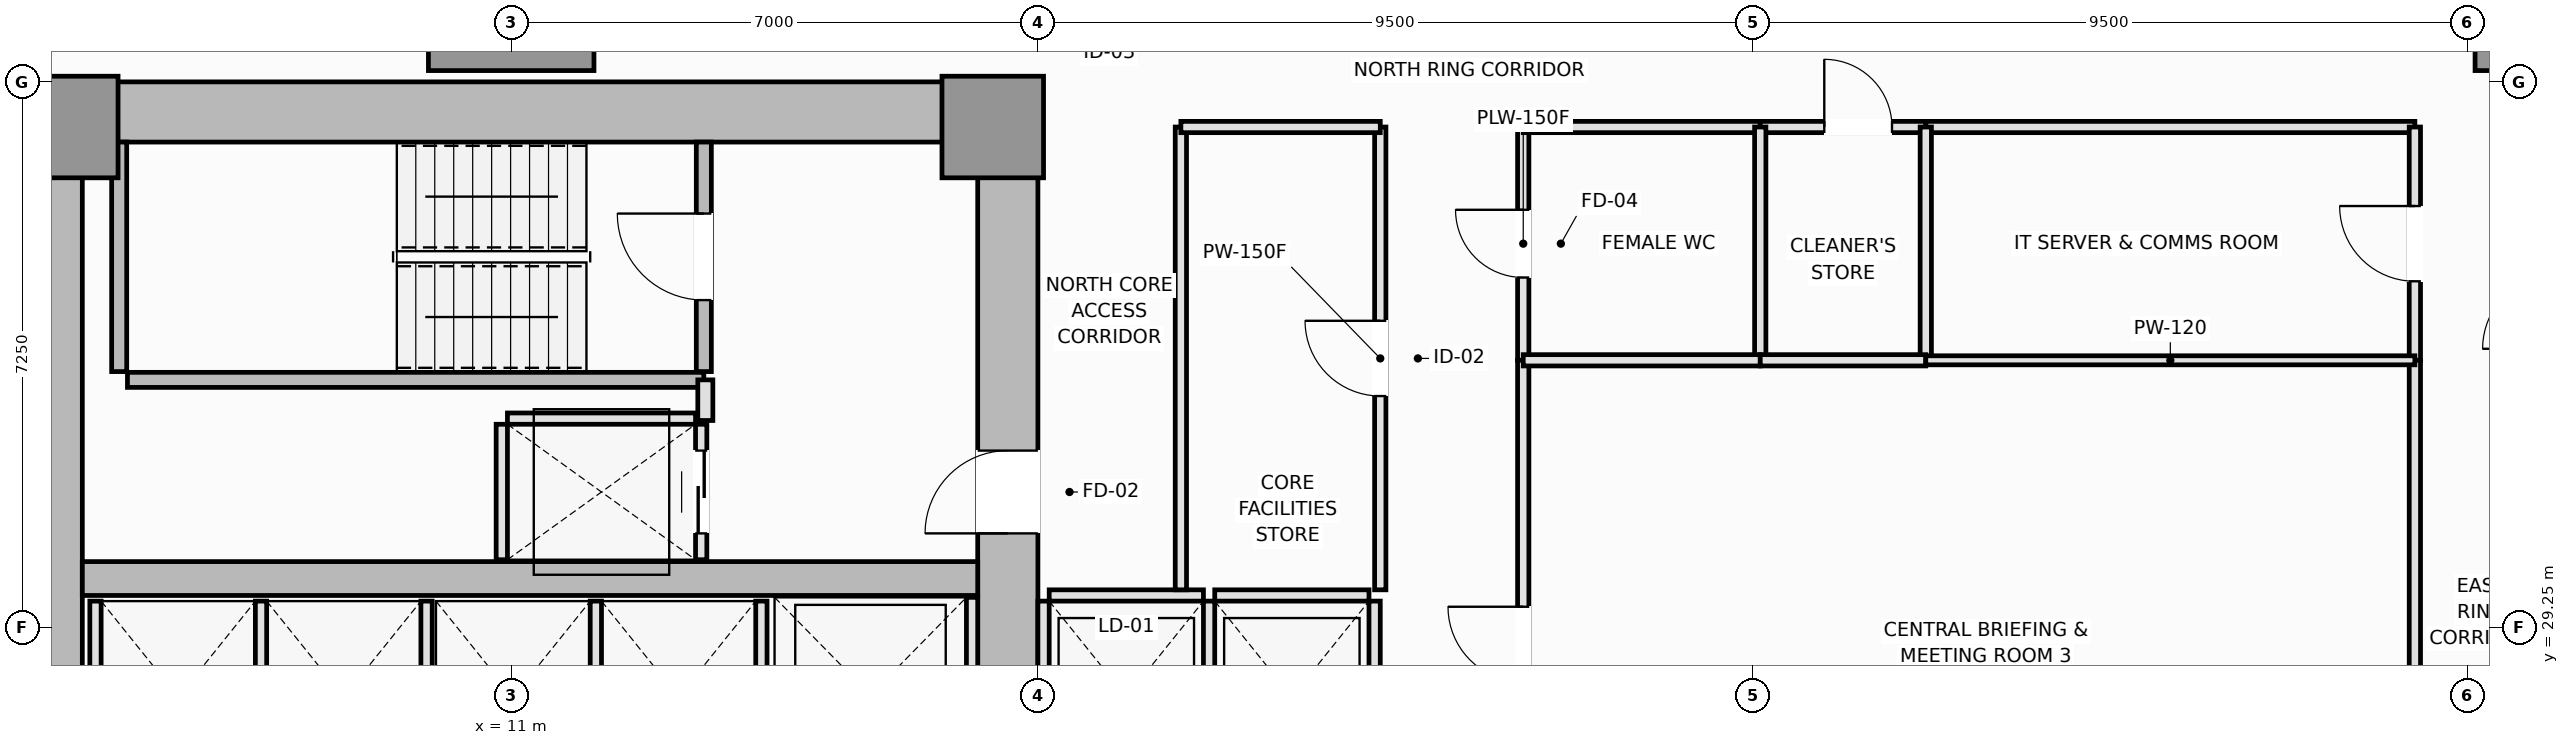
"""IFC4 building model, lengths in metres.
Left out: names, types, materials, properties, quantities, classifications, styles, units other than length and angle.
Written with IfcOpenShell. Run it as: python <this file> out.ifc"""

import sys

from ifc_helpers import new_model, si_unit, direction, frame, frame_2d, origin, origin_2d, place, context, subcontext, project, spatial, rectangle, extrude, element, fill, save


model = new_model("IFC4")
c1 = context("Model", 3, precision=1e-05, world=origin(), true_north=direction((0.0, 1.0)))
c2 = subcontext(c1, "Body", "Model", "MODEL_VIEW")
j1 = project(units=[si_unit("LENGTHUNIT", "METRE"), si_unit("PLANEANGLEUNIT", "RADIAN")], contexts=[c1])
p1 = place(None, origin())
s1 = spatial("IfcSite", under=j1, at=p1, CompositionType="ELEMENT")
p2 = place(p1, origin())
s2 = spatial("IfcBuilding", under=s1, at=p2, CompositionType="ELEMENT")
p3 = place(p2, frame((0.0, 0.0, 61.1)))
s3 = spatial("IfcBuildingStorey", under=s2, at=p3, CompositionType="ELEMENT", Elevation=61.1)
p4 = place(p3, frame((4.5, 36.1, 0.0), z_axis=(0.0, 0.0, 1.0), x_axis=(1.0, 0.0, 0.0)))
e1 = element("IfcWall", 1, at=p4, inside=s3, PredefinedType="SHEAR", context=c2, shape_type="SweptSolid", body=[
    extrude(rectangle(XDim=13.5, YDim=0.8, at=frame_2d((6.75, 0.0))), origin(), (0.0, 0.0, 1.0), 3.55),
])
p5 = place(p3, frame((4.9, 14.8, 0.0), z_axis=(0.0, 0.0, 1.0), x_axis=(0.0, 1.0, 0.0)))
e2 = element("IfcWall", 2, at=p5, inside=s3, PredefinedType="SHEAR", context=c2, shape_type="SweptSolid", body=[
    extrude(rectangle(XDim=20.9, YDim=0.8, at=frame_2d((10.45, 0.0))), origin(), (0.0, 0.0, 1.0), 3.55),
])
p6 = place(p3, frame((17.6, 27.05, 0.0), z_axis=(0.0, 0.0, 1.0), x_axis=(0.0, 1.0, 0.0)))
e3 = element("IfcWall", 3, at=p6, inside=s3, PredefinedType="SHEAR", context=c2, shape_type="SweptSolid", body=[
    extrude(rectangle(XDim=8.65, YDim=0.8, at=frame_2d((4.325, 0.0))), origin(), (0.0, 0.0, 1.0), 3.55),
])
p7 = place(p6, frame((3.45, 0.0, 0.0)))
e4 = element("IfcOpeningElement", 4, at=p7, cuts=e3, PredefinedType="OPENING", context=c2, shape_type="SweptSolid", body=[
    extrude(rectangle(XDim=1.1, YDim=2.15, at=frame_2d((0.55, 1.075))), frame((0.0, 0.41, 0.0), z_axis=(0.0, -1.0, 0.0), x_axis=(1.0, 0.0, 0.0)), (0.0, 0.0, 1.0), 0.82),
])
p8 = place(p3, frame((5.3, 29.9, 0.0), z_axis=(0.0, 0.0, 1.0), x_axis=(1.0, 0.0, 0.0)))
e5 = element("IfcWall", 5, at=p8, inside=s3, PredefinedType="SHEAR", context=c2, shape_type="SweptSolid", body=[
    extrude(rectangle(XDim=11.9, YDim=0.45, at=frame_2d((5.95, 0.0))), origin(), (0.0, 0.0, 1.0), 3.55),
])
for number, where, z_axis, x_axis in (
    (6, (5.1, 35.9, 0.0), (0.0, 0.0, 1.0), (1.0, 0.0, 0.0)),
    (7, (17.4, 35.9, 0.0), (0.0, 0.0, 1.0), (1.0, 0.0, 0.0)),
):
    element("IfcColumn", number, at=place(p3, frame(where, z_axis=z_axis, x_axis=x_axis)), inside=s3, PredefinedType="PILASTER", context=c2, shape_type="SweptSolid", body=[
        extrude(rectangle(XDim=1.35, YDim=1.35, at=origin_2d()), origin(), (0.0, 0.0, 1.0), 3.55),
    ])
for number, where, z_axis, x_axis in (
    (8, (11.0, 37.75, 0.0), (0.0, 0.0, 1.0), (1.0, 0.0, 0.0)),
    (9, (38.2, 37.75, 0.0), (0.0, 0.0, 1.0), (1.0, 0.0, 0.0)),
):
    element("IfcColumn", number, at=place(p3, frame(where, z_axis=z_axis, x_axis=x_axis)), inside=s3, PredefinedType="COLUMN", context=c2, shape_type="SweptSolid", body=[
        extrude(rectangle(XDim=2.2, YDim=2.2, at=origin_2d()), origin(), (0.0, 0.0, 1.0), 3.55),
    ])
p9 = place(p3, frame((5.79, 32.65, 0.0), z_axis=(0.0, 0.0, 1.0), x_axis=(0.0, 1.0, 0.0)))
e10 = element("IfcWall", 10, at=p9, inside=s3, PredefinedType="SOLIDWALL", context=c2, shape_type="SweptSolid", body=[
    extrude(rectangle(XDim=3.05, YDim=0.2, at=frame_2d((1.525, 0.0))), origin(), (0.0, 0.0, 1.0), 3.55),
])
p10 = place(p3, frame((5.9, 32.54, 0.0), z_axis=(0.0, 0.0, 1.0), x_axis=(1.0, 0.0, 0.0)))
e11 = element("IfcWall", 11, at=p10, inside=s3, PredefinedType="SOLIDWALL", context=c2, shape_type="SweptSolid", body=[
    extrude(rectangle(XDim=7.66, YDim=0.2, at=frame_2d((3.83, 0.0))), origin(), (0.0, 0.0, 1.0), 3.55),
])
p11 = place(p3, frame((13.56, 32.65, 0.0), z_axis=(0.0, 0.0, 1.0), x_axis=(0.0, 1.0, 0.0)))
e12 = element("IfcWall", 12, at=p11, inside=s3, PredefinedType="SOLIDWALL", context=c2, shape_type="SweptSolid", body=[
    extrude(rectangle(XDim=3.05, YDim=0.2, at=frame_2d((1.525, 0.0))), origin(), (0.0, 0.0, 1.0), 3.55),
])
p12 = place(p11, frame((0.95, 0.0, 0.0)))
e13 = element("IfcOpeningElement", 13, at=p12, cuts=e12, PredefinedType="OPENING", context=c2, shape_type="SweptSolid", body=[
    extrude(rectangle(XDim=1.15, YDim=2.15, at=frame_2d((0.575, 1.075))), frame((0.0, 0.11, 0.0), z_axis=(0.0, -1.0, 0.0), x_axis=(1.0, 0.0, 0.0)), (0.0, 0.0, 1.0), 0.22),
])
p13 = place(p3, frame((18.15, 29.675, 0.0), z_axis=(0.0, 0.0, 1.0), x_axis=(1.0, 0.0, 0.0)))
e14 = element("IfcWall", 14, at=p13, inside=s3, PredefinedType="PARTITIONING", context=c2, shape_type="SweptSolid", body=[
    extrude(rectangle(XDim=2.05, YDim=0.15, at=frame_2d((1.025, 0.0))), origin(), (0.0, 0.0, 1.0), 3.37),
])
for number, where, z_axis, x_axis in (
    (15, (18.075, 27.05, 0.0), (0.0, 0.0, 1.0), (0.0, 1.0, 0.0)),
    (16, (20.275, 27.05, 0.0), (0.0, 0.0, 1.0), (0.0, 1.0, 0.0)),
):
    element("IfcWall", number, at=place(p3, frame(where, z_axis=z_axis, x_axis=x_axis)), inside=s3, PredefinedType="PARTITIONING", context=c2, shape_type="SweptSolid", body=[
        extrude(rectangle(XDim=2.55, YDim=0.15, at=frame_2d((1.275, 0.0))), origin(), (0.0, 0.0, 1.0), 3.37),
    ])
p14 = place(p3, frame((20.35, 29.675, 0.0), z_axis=(0.0, 0.0, 1.0), x_axis=(1.0, 0.0, 0.0)))
e17 = element("IfcWall", 17, at=p14, inside=s3, PredefinedType="PARTITIONING", context=c2, shape_type="SweptSolid", body=[
    extrude(rectangle(XDim=2.05, YDim=0.15, at=frame_2d((1.025, 0.0))), origin(), (0.0, 0.0, 1.0), 3.37),
])
for number, where, z_axis, x_axis in (
    (18, (22.475, 27.05, 0.0), (0.0, 0.0, 1.0), (0.0, 1.0, 0.0)),
    (19, (5.475, 27.05, 0.0), (0.0, 0.0, 1.0), (0.0, 1.0, 0.0)),
    (20, (7.675, 27.05, 0.0), (0.0, 0.0, 1.0), (0.0, 1.0, 0.0)),
    (21, (9.875, 27.05, 0.0), (0.0, 0.0, 1.0), (0.0, 1.0, 0.0)),
    (22, (12.125, 27.05, 0.0), (0.0, 0.0, 1.0), (0.0, 1.0, 0.0)),
    (23, (14.325, 27.05, 0.0), (0.0, 0.0, 1.0), (0.0, 1.0, 0.0)),
):
    element("IfcWall", number, at=place(p3, frame(where, z_axis=z_axis, x_axis=x_axis)), inside=s3, PredefinedType="PARTITIONING", context=c2, shape_type="SweptSolid", body=[
        extrude(rectangle(XDim=2.55, YDim=0.15, at=frame_2d((1.275, 0.0))), origin(), (0.0, 0.0, 1.0), 3.37),
    ])
p15 = place(p3, frame((17.125, 27.05, 0.0), z_axis=(0.0, 0.0, 1.0), x_axis=(0.0, 1.0, 0.0)))
e24 = element("IfcWall", 24, at=p15, inside=s3, PredefinedType="PARTITIONING", context=c2, shape_type="SweptSolid", body=[
    extrude(rectangle(XDim=2.6, YDim=0.15, at=frame_2d((1.3, 0.0))), origin(), (0.0, 0.0, 1.0), 3.37),
])
p16 = place(p3, frame((10.95, 32.025, 0.0), z_axis=(0.0, 0.0, 1.0), x_axis=(1.0, 0.0, 0.0)))
e25 = element("IfcWall", 25, at=p16, inside=s3, PredefinedType="PARTITIONING", context=c2, shape_type="SweptSolid", body=[
    extrude(rectangle(XDim=2.5, YDim=0.15, at=frame_2d((1.25, 0.0))), origin(), (0.0, 0.0, 1.0), 3.37),
])
p17 = place(p3, frame((10.875, 30.15, 0.0), z_axis=(0.0, 0.0, 1.0), x_axis=(0.0, 1.0, 0.0)))
e26 = element("IfcWall", 26, at=p17, inside=s3, PredefinedType="PARTITIONING", context=c2, shape_type="SweptSolid", body=[
    extrude(rectangle(XDim=1.8, YDim=0.15, at=frame_2d((0.9, 0.0))), origin(), (0.0, 0.0, 1.0), 3.37),
])
p18 = place(p3, frame((13.525, 30.15, 0.0), z_axis=(0.0, 0.0, 1.0), x_axis=(0.0, 1.0, 0.0)))
e27 = element("IfcWall", 27, at=p18, inside=s3, PredefinedType="PARTITIONING", context=c2, shape_type="SweptSolid", body=[
    extrude(rectangle(XDim=1.8, YDim=0.15, at=frame_2d((0.9, 0.0))), origin(), (0.0, 0.0, 1.0), 3.37),
])
p19 = place(p18, frame((0.35, 0.0, 0.0)))
e28 = element("IfcOpeningElement", 28, at=p19, cuts=e27, PredefinedType="OPENING", context=c2, shape_type="SweptSolid", body=[
    extrude(rectangle(XDim=1.1, YDim=2.2, at=frame_2d((0.55, 1.1))), frame((0.0, 0.085, 0.0), z_axis=(0.0, -1.0, 0.0), x_axis=(1.0, 0.0, 0.0)), (0.0, 0.0, 1.0), 0.17),
])
p20 = place(p3, frame((13.58, 32.0, 0.0), z_axis=(0.0, 0.0, 1.0), x_axis=(0.0, 1.0, 0.0)))
e29 = element("IfcWall", 29, at=p20, inside=s3, PredefinedType="PARTITIONING", context=c2, shape_type="SweptSolid", body=[
    extrude(rectangle(XDim=0.54, YDim=0.2, at=frame_2d((0.27, 0.0))), origin(), (0.0, 0.0, 1.0), 3.37),
])
p21 = place(p3, frame((22.55, 29.75, 0.0), z_axis=(0.0, 0.0, 1.0), x_axis=(0.0, 1.0, 0.0)))
e30 = element("IfcWall", 30, at=p21, inside=s3, PredefinedType="PARTITIONING", context=c2, shape_type="SweptSolid", body=[
    extrude(rectangle(XDim=6.15, YDim=0.15, at=frame_2d((3.075, 0.0))), origin(), (0.0, 0.0, 1.0), 3.01),
])
p22 = place(p21, frame((2.575, 0.0, 0.0)))
e31 = element("IfcOpeningElement", 31, at=p22, cuts=e30, PredefinedType="OPENING", context=c2, shape_type="SweptSolid", body=[
    extrude(rectangle(XDim=1.0, YDim=2.15, at=frame_2d((0.5, 1.075))), frame((0.0, 0.085, 0.0), z_axis=(0.0, -1.0, 0.0), x_axis=(1.0, 0.0, 0.0)), (0.0, 0.0, 1.0), 0.17),
])
p23 = place(p3, frame((24.45, 32.8, 0.0), z_axis=(0.0, 0.0, 1.0), x_axis=(0.0, 1.0, 0.0)))
e32 = element("IfcWall", 32, at=p23, inside=s3, PredefinedType="PLUMBINGWALL", context=c2, shape_type="SweptSolid", body=[
    extrude(rectangle(XDim=3.1, YDim=0.15, at=frame_2d((1.55, 0.0))), origin(), (0.0, 0.0, 1.0), 3.37),
])
p24 = place(p23, frame((1.1, 0.0, 0.0)))
e33 = element("IfcOpeningElement", 33, at=p24, cuts=e32, PredefinedType="OPENING", context=c2, shape_type="SweptSolid", body=[
    extrude(rectangle(XDim=0.9, YDim=2.1, at=frame_2d((0.45, 1.05))), frame((0.0, 0.085, 0.0), z_axis=(0.0, -1.0, 0.0), x_axis=(1.0, 0.0, 0.0)), (0.0, 0.0, 1.0), 0.17),
])
p25 = place(p3, frame((24.45, 25.25, 0.0), z_axis=(0.0, 0.0, 1.0), x_axis=(0.0, 1.0, 0.0)))
e34 = element("IfcWall", 34, at=p25, inside=s3, PredefinedType="PARTITIONING", context=c2, shape_type="SweptSolid", body=[
    extrude(rectangle(XDim=7.55, YDim=0.15, at=frame_2d((3.775, 0.0))), origin(), (0.0, 0.0, 1.0), 3.37),
])
p26 = place(p25, frame((3.275, 0.0, 0.0)))
e35 = element("IfcOpeningElement", 35, at=p26, cuts=e34, PredefinedType="OPENING", context=c2, shape_type="SweptSolid", body=[
    extrude(rectangle(XDim=1.0, YDim=2.15, at=frame_2d((0.5, 1.075))), frame((0.0, 0.085, 0.0), z_axis=(0.0, -1.0, 0.0), x_axis=(1.0, 0.0, 0.0)), (0.0, 0.0, 1.0), 0.17),
])
p27 = place(p3, frame((19.9, 29.75, 0.0), z_axis=(0.0, 0.0, 1.0), x_axis=(0.0, 1.0, 0.0)))
e36 = element("IfcWall", 36, at=p27, inside=s3, PredefinedType="PARTITIONING", context=c2, shape_type="SweptSolid", body=[
    extrude(rectangle(XDim=6.15, YDim=0.15, at=frame_2d((3.075, 0.0))), origin(), (0.0, 0.0, 1.0), 3.37),
])
p28 = place(p3, frame((19.9, 35.9, 0.0), z_axis=(0.0, 0.0, 1.0), x_axis=(1.0, 0.0, 0.0)))
e37 = element("IfcWall", 37, at=p28, inside=s3, PredefinedType="PARTITIONING", context=c2, shape_type="SweptSolid", body=[
    extrude(rectangle(XDim=2.65, YDim=0.15, at=frame_2d((1.325, 0.0))), origin(), (0.0, 0.0, 1.0), 3.37),
])
p29 = place(p3, frame((24.45, 35.9, 0.0), z_axis=(0.0, 0.0, 1.0), x_axis=(1.0, 0.0, 0.0)))
e38 = element("IfcWall", 38, at=p29, inside=s3, PredefinedType="PLUMBINGWALL", context=c2, shape_type="SweptSolid", body=[
    extrude(rectangle(XDim=3.15, YDim=0.15, at=frame_2d((1.575, 0.0))), origin(), (0.0, 0.0, 1.0), 3.37),
])
p30 = place(p3, frame((27.6, 35.9, 0.0), z_axis=(0.0, 0.0, 1.0), x_axis=(1.0, 0.0, 0.0)))
e39 = element("IfcWall", 39, at=p30, inside=s3, PredefinedType="PLUMBINGWALL", context=c2, shape_type="SweptSolid", body=[
    extrude(rectangle(XDim=2.2, YDim=0.15, at=frame_2d((1.1, 0.0))), origin(), (0.0, 0.0, 1.0), 3.37),
])
p31 = place(p30, frame((0.851, 0.0, 0.0)))
e40 = element("IfcOpeningElement", 40, at=p31, cuts=e39, PredefinedType="OPENING", context=c2, shape_type="SweptSolid", body=[
    extrude(rectangle(XDim=0.9, YDim=2.1, at=frame_2d((0.45, 1.05))), frame((0.0, 0.085, 0.0), z_axis=(0.0, -1.0, 0.0), x_axis=(1.0, 0.0, 0.0)), (0.0, 0.0, 1.0), 0.17),
])
p32 = place(p3, frame((29.8, 35.9, 0.0), z_axis=(0.0, 0.0, 1.0), x_axis=(1.0, 0.0, 0.0)))
e41 = element("IfcWall", 41, at=p32, inside=s3, PredefinedType="PARTITIONING", context=c2, shape_type="SweptSolid", body=[
    extrude(rectangle(XDim=6.5, YDim=0.15, at=frame_2d((3.25, 0.0))), origin(), (0.0, 0.0, 1.0), 3.37),
])
p33 = place(p3, frame((36.3, 32.8, 0.0), z_axis=(0.0, 0.0, 1.0), x_axis=(0.0, 1.0, 0.0)))
e42 = element("IfcWall", 42, at=p33, inside=s3, PredefinedType="PARTITIONING", context=c2, shape_type="SweptSolid", body=[
    extrude(rectangle(XDim=3.1, YDim=0.15, at=frame_2d((1.55, 0.0))), origin(), (0.0, 0.0, 1.0), 3.37),
])
p34 = place(p33, frame((1.05, 0.0, 0.0)))
e43 = element("IfcOpeningElement", 43, at=p34, cuts=e42, PredefinedType="OPENING", context=c2, shape_type="SweptSolid", body=[
    extrude(rectangle(XDim=1.0, YDim=2.15, at=frame_2d((0.5, 1.075))), frame((0.0, 0.085, 0.0), z_axis=(0.0, -1.0, 0.0), x_axis=(1.0, 0.0, 0.0)), (0.0, 0.0, 1.0), 0.17),
])
p35 = place(p3, frame((36.3, 25.25, 0.0), z_axis=(0.0, 0.0, 1.0), x_axis=(0.0, 1.0, 0.0)))
e44 = element("IfcWall", 44, at=p35, inside=s3, PredefinedType="PARTITIONING", context=c2, shape_type="SweptSolid", body=[
    extrude(rectangle(XDim=7.55, YDim=0.15, at=frame_2d((3.775, 0.0))), origin(), (0.0, 0.0, 1.0), 3.37),
])
p36 = place(p3, frame((27.6, 32.8, 0.0), z_axis=(0.0, 0.0, 1.0), x_axis=(0.0, 1.0, 0.0)))
e45 = element("IfcWall", 45, at=p36, inside=s3, PredefinedType="PLUMBINGWALL", context=c2, shape_type="SweptSolid", body=[
    extrude(rectangle(XDim=3.1, YDim=0.15, at=frame_2d((1.55, 0.0))), origin(), (0.0, 0.0, 1.0), 3.37),
])
p37 = place(p3, frame((24.45, 32.8, 0.0), z_axis=(0.0, 0.0, 1.0), x_axis=(1.0, 0.0, 0.0)))
e46 = element("IfcWall", 46, at=p37, inside=s3, PredefinedType="PLUMBINGWALL", context=c2, shape_type="SweptSolid", body=[
    extrude(rectangle(XDim=3.15, YDim=0.15, at=frame_2d((1.575, 0.0))), origin(), (0.0, 0.0, 1.0), 3.37),
])
p38 = place(p3, frame((29.8, 32.8, 0.0), z_axis=(0.0, 0.0, 1.0), x_axis=(0.0, 1.0, 0.0)))
e47 = element("IfcWall", 47, at=p38, inside=s3, PredefinedType="PLUMBINGWALL", context=c2, shape_type="SweptSolid", body=[
    extrude(rectangle(XDim=3.1, YDim=0.15, at=frame_2d((1.55, 0.0))), origin(), (0.0, 0.0, 1.0), 3.37),
])
p39 = place(p3, frame((27.6, 32.8, 0.0), z_axis=(0.0, 0.0, 1.0), x_axis=(1.0, 0.0, 0.0)))
e48 = element("IfcWall", 48, at=p39, inside=s3, PredefinedType="PLUMBINGWALL", context=c2, shape_type="SweptSolid", body=[
    extrude(rectangle(XDim=2.2, YDim=0.15, at=frame_2d((1.1, 0.0))), origin(), (0.0, 0.0, 1.0), 3.37),
])
p40 = place(p3, frame((29.8, 32.8, 0.0), z_axis=(0.0, 0.0, 1.0), x_axis=(1.0, 0.0, 0.0)))
e49 = element("IfcWall", 49, at=p40, inside=s3, PredefinedType="PARTITIONING", context=c2, shape_type="SweptSolid", body=[
    extrude(rectangle(XDim=6.5, YDim=0.12, at=frame_2d((3.25, 0.0))), origin(), (0.0, 0.0, 1.0), 3.37),
])
p41 = place(p12, origin())
e50 = element("IfcDoor", 50, at=p41, inside=s3, OperationType="SINGLE_SWING_RIGHT", PredefinedType="DOOR", context=c2, shape_type="SweptSolid", body=[
    extrude(rectangle(XDim=1.15, YDim=2.15, at=frame_2d((0.575, 1.075))), frame((0.0, 0.025, 0.0), z_axis=(0.0, -1.0, 0.0), x_axis=(1.0, 0.0, 0.0)), (0.0, 0.0, 1.0), 0.05),
])
fill(e13, e50)
p42 = place(p19, origin())
e51 = element("IfcDoor", 51, at=p42, inside=s3, OperationType="DOUBLE_DOOR_SLIDING", PredefinedType="DOOR", context=c2, shape_type="SweptSolid", body=[
    extrude(rectangle(XDim=1.1, YDim=2.2, at=frame_2d((0.55, 1.1))), frame((0.0, 0.025, 0.0), z_axis=(0.0, -1.0, 0.0), x_axis=(1.0, 0.0, 0.0)), (0.0, 0.0, 1.0), 0.05),
])
fill(e28, e51)
p43 = place(p7, origin())
e52 = element("IfcDoor", 52, at=p43, inside=s3, OperationType="SINGLE_SWING_LEFT", PredefinedType="DOOR", context=c2, shape_type="SweptSolid", body=[
    extrude(rectangle(XDim=1.1, YDim=2.15, at=frame_2d((0.55, 1.075))), frame((0.0, 0.025, 0.0), z_axis=(0.0, -1.0, 0.0), x_axis=(1.0, 0.0, 0.0)), (0.0, 0.0, 1.0), 0.05),
])
fill(e4, e52)
p44 = place(p22, origin())
e53 = element("IfcDoor", 53, at=p44, inside=s3, OperationType="SINGLE_SWING_RIGHT", PredefinedType="DOOR", context=c2, shape_type="SweptSolid", body=[
    extrude(rectangle(XDim=1.0, YDim=2.15, at=frame_2d((0.5, 1.075))), frame((0.0, 0.025, 0.0), z_axis=(0.0, -1.0, 0.0), x_axis=(1.0, 0.0, 0.0)), (0.0, 0.0, 1.0), 0.05),
])
fill(e31, e53)
p45 = place(p24, origin())
e54 = element("IfcDoor", 54, at=p45, inside=s3, OperationType="SINGLE_SWING_RIGHT", PredefinedType="DOOR", context=c2, shape_type="SweptSolid", body=[
    extrude(rectangle(XDim=0.9, YDim=2.1, at=frame_2d((0.45, 1.05))), frame((0.0, 0.025, 0.0), z_axis=(0.0, -1.0, 0.0), x_axis=(1.0, 0.0, 0.0)), (0.0, 0.0, 1.0), 0.05),
])
fill(e33, e54)
p46 = place(p26, origin())
e55 = element("IfcDoor", 55, at=p46, inside=s3, OperationType="SINGLE_SWING_RIGHT", PredefinedType="DOOR", context=c2, shape_type="SweptSolid", body=[
    extrude(rectangle(XDim=1.0, YDim=2.15, at=frame_2d((0.5, 1.075))), frame((0.0, 0.025, 0.0), z_axis=(0.0, -1.0, 0.0), x_axis=(1.0, 0.0, 0.0)), (0.0, 0.0, 1.0), 0.05),
])
fill(e35, e55)
p47 = place(p31, origin())
e56 = element("IfcDoor", 56, at=p47, inside=s3, OperationType="SINGLE_SWING_LEFT", PredefinedType="DOOR", context=c2, shape_type="SweptSolid", body=[
    extrude(rectangle(XDim=0.9, YDim=2.1, at=frame_2d((0.45, 1.05))), frame((0.0, 0.025, 0.0), z_axis=(0.0, -1.0, 0.0), x_axis=(1.0, 0.0, 0.0)), (0.0, 0.0, 1.0), 0.05),
])
fill(e40, e56)
p48 = place(p34, origin())
e57 = element("IfcDoor", 57, at=p48, inside=s3, OperationType="SINGLE_SWING_RIGHT", PredefinedType="DOOR", context=c2, shape_type="SweptSolid", body=[
    extrude(rectangle(XDim=1.0, YDim=2.15, at=frame_2d((0.5, 1.075))), frame((0.0, 0.025, 0.0), z_axis=(0.0, -1.0, 0.0), x_axis=(1.0, 0.0, 0.0)), (0.0, 0.0, 1.0), 0.05),
])
fill(e43, e57)
save(model, sys.argv[1])
